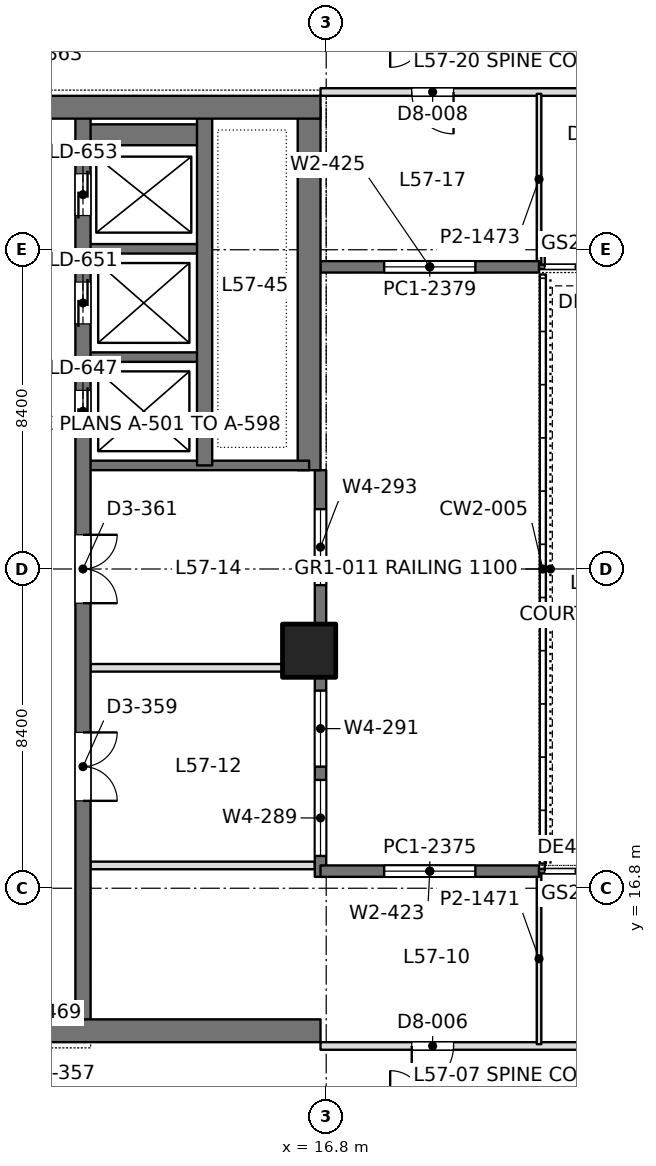
"""IFC4 building model, lengths in metres.
Left out: names, types, materials, properties, quantities, classifications, styles, units other than length and angle.
Written with IfcOpenShell. Run it as: python <this file> out.ifc"""

import sys

from ifc_helpers import new_model, si_unit, direction, frame, frame_2d, origin, origin_2d, place, context, subcontext, project, spatial, rectangle, extrude, element, fill, save


model = new_model("IFC4")
c1 = context("Model", 3, precision=1e-05, world=origin(), true_north=direction((0.0, 1.0)))
c2 = subcontext(c1, "Body", "Model", "MODEL_VIEW")
j1 = project(units=[si_unit("LENGTHUNIT", "METRE"), si_unit("PLANEANGLEUNIT", "RADIAN")], contexts=[c1])
p1 = place(None, origin())
s1 = spatial("IfcSite", under=j1, at=p1, CompositionType="ELEMENT")
p2 = place(p1, origin())
s2 = spatial("IfcBuilding", under=s1, at=p2, CompositionType="ELEMENT")
p3 = place(p2, frame((0.0, 0.0, 250.2)))
s3 = spatial("IfcBuildingStorey", under=s2, at=p3, CompositionType="ELEMENT", Elevation=250.2)
p4 = place(p3, frame((16.35, 23.05, 0.0), z_axis=(0.0, 0.0, 1.0), x_axis=(1.0, 0.0, 0.0)))
e1 = element("IfcColumn", 1, at=p4, inside=s3, PredefinedType="COLUMN", context=c2, shape_type="SweptSolid", body=[
    extrude(rectangle(XDim=1.4, YDim=1.4, at=origin_2d()), origin(), (0.0, 0.0, 1.0), 4.5),
])
p5 = place(p3, frame((-1.05, 13.05, 0.0), z_axis=(0.0, 0.0, 1.0), x_axis=(1.0, 0.0, 0.0)))
e2 = element("IfcWall", 2, at=p5, inside=s3, PredefinedType="SHEAR", context=c2, shape_type="SweptSolid", body=[
    extrude(rectangle(XDim=17.7, YDim=0.6, at=frame_2d((8.85, 0.0))), origin(), (0.0, 0.0, 1.0), 4.5),
])
p6 = place(p5, frame((8.8, 0.0, 0.0)))
e3 = element("IfcOpeningElement", 3, at=p6, cuts=e2, PredefinedType="OPENING", context=c2, shape_type="SweptSolid", body=[
    extrude(rectangle(XDim=1.8, YDim=2.4, at=frame_2d((0.9, 1.2))), frame((0.0, 0.31, 0.0), z_axis=(0.0, -1.0, 0.0), x_axis=(1.0, 0.0, 0.0)), (0.0, 0.0, 1.0), 0.62),
])
p7 = place(p3, frame((-1.05, 37.35, 0.0), z_axis=(0.0, 0.0, 1.0), x_axis=(1.0, 0.0, 0.0)))
e4 = element("IfcWall", 4, at=p7, inside=s3, PredefinedType="SHEAR", context=c2, shape_type="SweptSolid", body=[
    extrude(rectangle(XDim=17.7, YDim=0.6, at=frame_2d((8.85, 0.0))), origin(), (0.0, 0.0, 1.0), 4.5),
])
p8 = place(p7, frame((8.8, 0.0, 0.0)))
e5 = element("IfcOpeningElement", 5, at=p8, cuts=e4, PredefinedType="OPENING", context=c2, shape_type="SweptSolid", body=[
    extrude(rectangle(XDim=1.8, YDim=2.4, at=frame_2d((0.9, 1.2))), frame((0.0, 0.31, 0.0), z_axis=(0.0, -1.0, 0.0), x_axis=(1.0, 0.0, 0.0)), (0.0, 0.0, 1.0), 0.62),
])
p9 = place(p3, frame((16.35, 27.8, 0.0), z_axis=(0.0, 0.0, 1.0), x_axis=(0.0, 1.0, 0.0)))
e6 = element("IfcWall", 6, at=p9, inside=s3, PredefinedType="SHEAR", context=c2, shape_type="SweptSolid", body=[
    extrude(rectangle(XDim=9.55, YDim=0.6, at=frame_2d((4.775, 0.0))), origin(), (0.0, 0.0, 1.0), 4.5),
])
p10 = place(p3, frame((10.4, 13.05, 0.0), z_axis=(0.0, 0.0, 1.0), x_axis=(0.0, 1.0, 0.0)))
e7 = element("IfcWall", 7, at=p10, inside=s3, PredefinedType="SHEAR", context=c2, shape_type="SweptSolid", body=[
    extrude(rectangle(XDim=24.3, YDim=0.4, at=frame_2d((12.15, 0.0))), origin(), (0.0, 0.0, 1.0), 4.5),
])
p11 = place(p10, frame((15.75, 0.0, 0.0)))
e8 = element("IfcOpeningElement", 8, at=p11, cuts=e7, PredefinedType="OPENING", context=c2, shape_type="SweptSolid", body=[
    extrude(rectangle(XDim=1.1, YDim=2.2, at=frame_2d((0.55, 1.1))), frame((0.0, 0.21, 0.0), z_axis=(0.0, -1.0, 0.0), x_axis=(1.0, 0.0, 0.0)), (0.0, 0.0, 1.0), 0.42),
])
p12 = place(p10, frame((18.6, 0.0, 0.0)))
e9 = element("IfcOpeningElement", 9, at=p12, cuts=e7, PredefinedType="OPENING", context=c2, shape_type="SweptSolid", body=[
    extrude(rectangle(XDim=1.1, YDim=2.2, at=frame_2d((0.55, 1.1))), frame((0.0, 0.21, 0.0), z_axis=(0.0, -1.0, 0.0), x_axis=(1.0, 0.0, 0.0)), (0.0, 0.0, 1.0), 0.42),
])
p13 = place(p10, frame((21.45, 0.0, 0.0)))
e10 = element("IfcOpeningElement", 10, at=p13, cuts=e7, PredefinedType="OPENING", context=c2, shape_type="SweptSolid", body=[
    extrude(rectangle(XDim=1.1, YDim=2.2, at=frame_2d((0.55, 1.1))), frame((0.0, 0.21, 0.0), z_axis=(0.0, -1.0, 0.0), x_axis=(1.0, 0.0, 0.0)), (0.0, 0.0, 1.0), 0.42),
])
p14 = place(p10, frame((6.05, 0.0, 0.0)))
e11 = element("IfcOpeningElement", 11, at=p14, cuts=e7, PredefinedType="OPENING", context=c2, shape_type="SweptSolid", body=[
    extrude(rectangle(XDim=1.8, YDim=2.4, at=frame_2d((0.9, 1.2))), frame((0.0, 0.21, 0.0), z_axis=(0.0, -1.0, 0.0), x_axis=(1.0, 0.0, 0.0)), (0.0, 0.0, 1.0), 0.42),
])
p15 = place(p10, frame((11.25, 0.0, 0.0)))
e12 = element("IfcOpeningElement", 12, at=p15, cuts=e7, PredefinedType="OPENING", context=c2, shape_type="SweptSolid", body=[
    extrude(rectangle(XDim=1.8, YDim=2.4, at=frame_2d((0.9, 1.2))), frame((0.0, 0.21, 0.0), z_axis=(0.0, -1.0, 0.0), x_axis=(1.0, 0.0, 0.0)), (0.0, 0.0, 1.0), 0.42),
])
p16 = place(p3, frame((13.6, 27.925, 0.0), z_axis=(0.0, 0.0, 1.0), x_axis=(0.0, 1.0, 0.0)))
e13 = element("IfcWall", 13, at=p16, inside=s3, PredefinedType="SHEAR", context=c2, shape_type="SweptSolid", body=[
    extrude(rectangle(XDim=9.425, YDim=0.4, at=frame_2d((4.712, 0.0))), origin(), (0.0, 0.0, 1.0), 4.5),
])
p17 = place(p3, frame((10.4, 27.925, 0.0), z_axis=(0.0, 0.0, 1.0), x_axis=(1.0, 0.0, 0.0)))
e14 = element("IfcWall", 14, at=p17, inside=s3, PredefinedType="SHEAR", context=c2, shape_type="SweptSolid", body=[
    extrude(rectangle(XDim=5.95, YDim=0.25, at=frame_2d((2.975, 0.0))), origin(), (0.0, 0.0, 1.0), 4.5),
])
for number, where, z_axis, x_axis in (
    (15, (10.4, 30.775, 0.0), (0.0, 0.0, 1.0), (1.0, 0.0, 0.0)),
    (16, (10.4, 33.625, 0.0), (0.0, 0.0, 1.0), (1.0, 0.0, 0.0)),
):
    element("IfcWall", number, at=place(p3, frame(where, z_axis=z_axis, x_axis=x_axis)), inside=s3, PredefinedType="SHEAR", context=c2, shape_type="SweptSolid", body=[
        extrude(rectangle(XDim=3.2, YDim=0.25, at=frame_2d((1.6, 0.0))), origin(), (0.0, 0.0, 1.0), 4.5),
    ])
p18 = place(p3, frame((10.4, 36.625, 0.0), z_axis=(0.0, 0.0, 1.0), x_axis=(1.0, 0.0, 0.0)))
e17 = element("IfcWall", 17, at=p18, inside=s3, PredefinedType="SHEAR", context=c2, shape_type="SweptSolid", body=[
    extrude(rectangle(XDim=3.2, YDim=0.55, at=frame_2d((1.6, 0.0))), origin(), (0.0, 0.0, 1.0), 4.5),
])
p19 = place(p3, frame((16.65, 17.1, 0.0), z_axis=(0.0, 0.0, 1.0), x_axis=(0.0, 1.0, 0.0)))
e18 = element("IfcWall", 18, at=p19, inside=s3, PredefinedType="SOLIDWALL", context=c2, shape_type="SweptSolid", body=[
    extrude(rectangle(XDim=10.7, YDim=0.3, at=frame_2d((5.35, 0.0))), origin(), (0.0, 0.0, 1.0), 4.35),
])
p20 = place(p19, frame((0.55, 0.0, 0.9)))
e19 = element("IfcOpeningElement", 19, at=p20, cuts=e18, PredefinedType="OPENING", context=c2, shape_type="SweptSolid", body=[
    extrude(rectangle(XDim=2.0, YDim=1.9, at=frame_2d((1.0, 0.95))), frame((0.0, 0.16, 0.0), z_axis=(0.0, -1.0, 0.0), x_axis=(1.0, 0.0, 0.0)), (0.0, 0.0, 1.0), 0.32),
])
p21 = place(p19, frame((2.9, 0.0, 0.9)))
e20 = element("IfcOpeningElement", 20, at=p21, cuts=e18, PredefinedType="OPENING", context=c2, shape_type="SweptSolid", body=[
    extrude(rectangle(XDim=2.0, YDim=1.9, at=frame_2d((1.0, 0.95))), frame((0.0, 0.16, 0.0), z_axis=(0.0, -1.0, 0.0), x_axis=(1.0, 0.0, 0.0)), (0.0, 0.0, 1.0), 0.32),
])
p22 = place(p19, frame((7.675, 0.0, 0.9)))
e21 = element("IfcOpeningElement", 21, at=p22, cuts=e18, PredefinedType="OPENING", context=c2, shape_type="SweptSolid", body=[
    extrude(rectangle(XDim=2.0, YDim=1.9, at=frame_2d((1.0, 0.95))), frame((0.0, 0.16, 0.0), z_axis=(0.0, -1.0, 0.0), x_axis=(1.0, 0.0, 0.0)), (0.0, 0.0, 1.0), 0.32),
])
p23 = place(p3, frame((16.65, 17.25, 0.0), z_axis=(0.0, 0.0, 1.0), x_axis=(1.0, 0.0, 0.0)))
e22 = element("IfcWall", 22, at=p23, inside=s3, PredefinedType="SOLIDWALL", context=c2, shape_type="SweptSolid", body=[
    extrude(rectangle(XDim=5.75, YDim=0.3, at=frame_2d((2.875, 0.0))), origin(), (0.0, 0.0, 1.0), 4.35),
])
p24 = place(p23, frame((1.675, 0.0, 0.9)))
e23 = element("IfcOpeningElement", 23, at=p24, cuts=e22, PredefinedType="OPENING", context=c2, shape_type="SweptSolid", body=[
    extrude(rectangle(XDim=2.4, YDim=1.9, at=frame_2d((1.2, 0.95))), frame((0.0, 0.16, 0.0), z_axis=(0.0, -1.0, 0.0), x_axis=(1.0, 0.0, 0.0)), (0.0, 0.0, 1.0), 0.32),
])
p25 = place(p3, frame((22.4, 17.25, 0.0), z_axis=(0.0, 0.0, 1.0), x_axis=(1.0, 0.0, 0.0)))
e24 = element("IfcWall", 24, at=p25, inside=s3, PredefinedType="SOLIDWALL", context=c2, shape_type="SweptSolid", body=[
    extrude(rectangle(XDim=2.3, YDim=0.12, at=frame_2d((1.15, 0.0))), origin(), (0.0, 0.0, 1.0), 4.35),
])
p26 = place(p25, frame((0.15, 0.0, 0.0)))
e25 = element("IfcOpeningElement", 25, at=p26, cuts=e24, PredefinedType="OPENING", context=c2, shape_type="SweptSolid", body=[
    extrude(rectangle(XDim=1.8, YDim=2.4, at=frame_2d((0.9, 1.2))), frame((0.0, 0.07, 0.0), z_axis=(0.0, -1.0, 0.0), x_axis=(1.0, 0.0, 0.0)), (0.0, 0.0, 1.0), 0.14),
])
p27 = place(p3, frame((16.65, 33.15, 0.0), z_axis=(0.0, 0.0, 1.0), x_axis=(1.0, 0.0, 0.0)))
e26 = element("IfcWall", 26, at=p27, inside=s3, PredefinedType="SOLIDWALL", context=c2, shape_type="SweptSolid", body=[
    extrude(rectangle(XDim=5.75, YDim=0.3, at=frame_2d((2.875, 0.0))), origin(), (0.0, 0.0, 1.0), 4.35),
])
p28 = place(p27, frame((1.675, 0.0, 0.9)))
e27 = element("IfcOpeningElement", 27, at=p28, cuts=e26, PredefinedType="OPENING", context=c2, shape_type="SweptSolid", body=[
    extrude(rectangle(XDim=2.4, YDim=1.9, at=frame_2d((1.2, 0.95))), frame((0.0, 0.16, 0.0), z_axis=(0.0, -1.0, 0.0), x_axis=(1.0, 0.0, 0.0)), (0.0, 0.0, 1.0), 0.32),
])
p29 = place(p3, frame((22.4, 33.15, 0.0), z_axis=(0.0, 0.0, 1.0), x_axis=(1.0, 0.0, 0.0)))
e28 = element("IfcWall", 28, at=p29, inside=s3, PredefinedType="SOLIDWALL", context=c2, shape_type="SweptSolid", body=[
    extrude(rectangle(XDim=2.3, YDim=0.12, at=frame_2d((1.15, 0.0))), origin(), (0.0, 0.0, 1.0), 4.35),
])
p30 = place(p29, frame((0.15, 0.0, 0.0)))
e29 = element("IfcOpeningElement", 29, at=p30, cuts=e28, PredefinedType="OPENING", context=c2, shape_type="SweptSolid", body=[
    extrude(rectangle(XDim=1.8, YDim=2.4, at=frame_2d((0.9, 1.2))), frame((0.0, 0.07, 0.0), z_axis=(0.0, -1.0, 0.0), x_axis=(1.0, 0.0, 0.0)), (0.0, 0.0, 1.0), 0.14),
])
p31 = place(p3, frame((10.598, 17.4, 0.0), z_axis=(0.0, 0.0, 1.0), x_axis=(1.0, 0.0, 0.0)))
e30 = element("IfcWall", 30, at=p31, inside=s3, PredefinedType="PARTITIONING", context=c2, shape_type="SweptSolid", body=[
    extrude(rectangle(XDim=5.904, YDim=0.2, at=frame_2d((2.952, 0.0))), origin(), (0.0, 0.0, 1.0), 3.8),
])
p32 = place(p3, frame((10.598, 22.6, 0.0), z_axis=(0.0, 0.0, 1.0), x_axis=(1.0, 0.0, 0.0)))
e31 = element("IfcWall", 31, at=p32, inside=s3, PredefinedType="PARTITIONING", context=c2, shape_type="SweptSolid", body=[
    extrude(rectangle(XDim=5.053, YDim=0.2, at=frame_2d((2.526, 0.0))), origin(), (0.0, 0.0, 1.0), 4.35),
])
p33 = place(p3, frame((16.65, 12.65, 0.0), z_axis=(0.0, 0.0, 1.0), x_axis=(1.0, 0.0, 0.0)))
e32 = element("IfcWall", 32, at=p33, inside=s3, PredefinedType="PARTITIONING", context=c2, shape_type="SweptSolid", body=[
    extrude(rectangle(XDim=17.1, YDim=0.2, at=frame_2d((8.55, 0.0))), origin(), (0.0, 0.0, 1.0), 3.8),
])
p34 = place(p33, frame((2.4, 0.0, 0.0)))
e33 = element("IfcOpeningElement", 33, at=p34, cuts=e32, PredefinedType="OPENING", context=c2, shape_type="SweptSolid", body=[
    extrude(rectangle(XDim=1.1, YDim=2.4, at=frame_2d((0.55, 1.2))), frame((0.0, 0.11, 0.0), z_axis=(0.0, -1.0, 0.0), x_axis=(1.0, 0.0, 0.0)), (0.0, 0.0, 1.0), 0.22),
])
p35 = place(p33, frame((7.65, 0.0, 0.0)))
e34 = element("IfcOpeningElement", 34, at=p35, cuts=e32, PredefinedType="OPENING", context=c2, shape_type="SweptSolid", body=[
    extrude(rectangle(XDim=1.8, YDim=2.2, at=frame_2d((0.9, 1.1))), frame((0.0, 0.11, 0.0), z_axis=(0.0, -1.0, 0.0), x_axis=(1.0, 0.0, 0.0)), (0.0, 0.0, 1.0), 0.22),
])
p36 = place(p33, frame((13.6, 0.0, 0.0)))
e35 = element("IfcOpeningElement", 35, at=p36, cuts=e32, PredefinedType="OPENING", context=c2, shape_type="SweptSolid", body=[
    extrude(rectangle(XDim=1.1, YDim=2.4, at=frame_2d((0.55, 1.2))), frame((0.0, 0.11, 0.0), z_axis=(0.0, -1.0, 0.0), x_axis=(1.0, 0.0, 0.0)), (0.0, 0.0, 1.0), 0.22),
])
p37 = place(p3, frame((22.4, 12.698, 0.0), z_axis=(0.0, 0.0, 1.0), x_axis=(0.0, 1.0, 0.0)))
e36 = element("IfcWall", 36, at=p37, inside=s3, PredefinedType="PARTITIONING", context=c2, shape_type="SweptSolid", body=[
    extrude(rectangle(XDim=4.494, YDim=0.12, at=frame_2d((2.247, 0.0))), origin(), (0.0, 0.0, 1.0), 3.5),
])
p38 = place(p3, frame((16.65, 37.75, 0.0), z_axis=(0.0, 0.0, 1.0), x_axis=(1.0, 0.0, 0.0)))
e37 = element("IfcWall", 37, at=p38, inside=s3, PredefinedType="PARTITIONING", context=c2, shape_type="SweptSolid", body=[
    extrude(rectangle(XDim=17.1, YDim=0.2, at=frame_2d((8.55, 0.0))), origin(), (0.0, 0.0, 1.0), 3.8),
])
p39 = place(p38, frame((2.4, 0.0, 0.0)))
e38 = element("IfcOpeningElement", 38, at=p39, cuts=e37, PredefinedType="OPENING", context=c2, shape_type="SweptSolid", body=[
    extrude(rectangle(XDim=1.1, YDim=2.4, at=frame_2d((0.55, 1.2))), frame((0.0, 0.11, 0.0), z_axis=(0.0, -1.0, 0.0), x_axis=(1.0, 0.0, 0.0)), (0.0, 0.0, 1.0), 0.22),
])
p40 = place(p38, frame((7.65, 0.0, 0.0)))
e39 = element("IfcOpeningElement", 39, at=p40, cuts=e37, PredefinedType="OPENING", context=c2, shape_type="SweptSolid", body=[
    extrude(rectangle(XDim=1.8, YDim=2.2, at=frame_2d((0.9, 1.1))), frame((0.0, 0.11, 0.0), z_axis=(0.0, -1.0, 0.0), x_axis=(1.0, 0.0, 0.0)), (0.0, 0.0, 1.0), 0.22),
])
p41 = place(p38, frame((13.6, 0.0, 0.0)))
e40 = element("IfcOpeningElement", 40, at=p41, cuts=e37, PredefinedType="OPENING", context=c2, shape_type="SweptSolid", body=[
    extrude(rectangle(XDim=1.1, YDim=2.4, at=frame_2d((0.55, 1.2))), frame((0.0, 0.11, 0.0), z_axis=(0.0, -1.0, 0.0), x_axis=(1.0, 0.0, 0.0)), (0.0, 0.0, 1.0), 0.22),
])
p42 = place(p3, frame((22.4, 33.208, 0.0), z_axis=(0.0, 0.0, 1.0), x_axis=(0.0, 1.0, 0.0)))
e41 = element("IfcWall", 41, at=p42, inside=s3, PredefinedType="PARTITIONING", context=c2, shape_type="SweptSolid", body=[
    extrude(rectangle(XDim=4.494, YDim=0.12, at=frame_2d((2.247, 0.0))), origin(), (0.0, 0.0, 1.0), 3.5),
])
p43 = place(p20, origin())
e42 = element("IfcWindow", 42, at=p43, inside=s3, PartitioningType="SINGLE_PANEL", PredefinedType="WINDOW", context=c2, shape_type="SweptSolid", body=[
    extrude(rectangle(XDim=2.0, YDim=1.9, at=frame_2d((1.0, 0.95))), frame((0.0, 0.03, 0.0), z_axis=(0.0, -1.0, 0.0), x_axis=(1.0, 0.0, 0.0)), (0.0, 0.0, 1.0), 0.06),
])
fill(e19, e42)
p44 = place(p21, origin())
e43 = element("IfcWindow", 43, at=p44, inside=s3, PartitioningType="SINGLE_PANEL", PredefinedType="WINDOW", context=c2, shape_type="SweptSolid", body=[
    extrude(rectangle(XDim=2.0, YDim=1.9, at=frame_2d((1.0, 0.95))), frame((0.0, 0.03, 0.0), z_axis=(0.0, -1.0, 0.0), x_axis=(1.0, 0.0, 0.0)), (0.0, 0.0, 1.0), 0.06),
])
fill(e20, e43)
p45 = place(p22, origin())
e44 = element("IfcWindow", 44, at=p45, inside=s3, PartitioningType="SINGLE_PANEL", PredefinedType="WINDOW", context=c2, shape_type="SweptSolid", body=[
    extrude(rectangle(XDim=2.0, YDim=1.9, at=frame_2d((1.0, 0.95))), frame((0.0, 0.03, 0.0), z_axis=(0.0, -1.0, 0.0), x_axis=(1.0, 0.0, 0.0)), (0.0, 0.0, 1.0), 0.06),
])
fill(e21, e44)
p46 = place(p24, origin())
e45 = element("IfcWindow", 45, at=p46, inside=s3, PartitioningType="SINGLE_PANEL", PredefinedType="WINDOW", context=c2, shape_type="SweptSolid", body=[
    extrude(rectangle(XDim=2.4, YDim=1.9, at=frame_2d((1.2, 0.95))), frame((0.0, 0.03, 0.0), z_axis=(0.0, -1.0, 0.0), x_axis=(1.0, 0.0, 0.0)), (0.0, 0.0, 1.0), 0.06),
])
fill(e23, e45)
p47 = place(p26, origin())
e46 = element("IfcDoor", 46, at=p47, inside=s3, OperationType="DOUBLE_DOOR_SINGLE_SWING", PredefinedType="DOOR", context=c2, shape_type="SweptSolid", body=[
    extrude(rectangle(XDim=1.8, YDim=2.4, at=frame_2d((0.9, 1.2))), frame((0.0, 0.025, 0.0), z_axis=(0.0, -1.0, 0.0), x_axis=(1.0, 0.0, 0.0)), (0.0, 0.0, 1.0), 0.05),
])
fill(e25, e46)
p48 = place(p28, origin())
e47 = element("IfcWindow", 47, at=p48, inside=s3, PartitioningType="SINGLE_PANEL", PredefinedType="WINDOW", context=c2, shape_type="SweptSolid", body=[
    extrude(rectangle(XDim=2.4, YDim=1.9, at=frame_2d((1.2, 0.95))), frame((0.0, 0.03, 0.0), z_axis=(0.0, -1.0, 0.0), x_axis=(1.0, 0.0, 0.0)), (0.0, 0.0, 1.0), 0.06),
])
fill(e27, e47)
p49 = place(p30, origin())
e48 = element("IfcDoor", 48, at=p49, inside=s3, OperationType="DOUBLE_DOOR_SINGLE_SWING", PredefinedType="DOOR", context=c2, shape_type="SweptSolid", body=[
    extrude(rectangle(XDim=1.8, YDim=2.4, at=frame_2d((0.9, 1.2))), frame((0.0, 0.025, 0.0), z_axis=(0.0, -1.0, 0.0), x_axis=(1.0, 0.0, 0.0)), (0.0, 0.0, 1.0), 0.05),
])
fill(e29, e48)
p50 = place(p11, origin())
e49 = element("IfcDoor", 49, at=p50, inside=s3, OperationType="DOUBLE_DOOR_SLIDING", PredefinedType="DOOR", context=c2, shape_type="SweptSolid", body=[
    extrude(rectangle(XDim=1.1, YDim=2.2, at=frame_2d((0.55, 1.1))), frame((0.0, 0.025, 0.0), z_axis=(0.0, -1.0, 0.0), x_axis=(1.0, 0.0, 0.0)), (0.0, 0.0, 1.0), 0.05),
])
fill(e8, e49)
p51 = place(p12, origin())
e50 = element("IfcDoor", 50, at=p51, inside=s3, OperationType="DOUBLE_DOOR_SLIDING", PredefinedType="DOOR", context=c2, shape_type="SweptSolid", body=[
    extrude(rectangle(XDim=1.1, YDim=2.2, at=frame_2d((0.55, 1.1))), frame((0.0, 0.025, 0.0), z_axis=(0.0, -1.0, 0.0), x_axis=(1.0, 0.0, 0.0)), (0.0, 0.0, 1.0), 0.05),
])
fill(e9, e50)
p52 = place(p13, origin())
e51 = element("IfcDoor", 51, at=p52, inside=s3, OperationType="DOUBLE_DOOR_SLIDING", PredefinedType="DOOR", context=c2, shape_type="SweptSolid", body=[
    extrude(rectangle(XDim=1.1, YDim=2.2, at=frame_2d((0.55, 1.1))), frame((0.0, 0.025, 0.0), z_axis=(0.0, -1.0, 0.0), x_axis=(1.0, 0.0, 0.0)), (0.0, 0.0, 1.0), 0.05),
])
fill(e10, e51)
p53 = place(p14, frame((1.8, 0.0, 0.0), z_axis=(0.0, 0.0, 1.0), x_axis=(-1.0, 0.0, 0.0)))
e52 = element("IfcDoor", 52, at=p53, inside=s3, OperationType="DOUBLE_DOOR_SINGLE_SWING", PredefinedType="DOOR", context=c2, shape_type="SweptSolid", body=[
    extrude(rectangle(XDim=1.8, YDim=2.4, at=frame_2d((0.9, 1.2))), frame((0.0, 0.025, 0.0), z_axis=(0.0, -1.0, 0.0), x_axis=(1.0, 0.0, 0.0)), (0.0, 0.0, 1.0), 0.05),
])
fill(e11, e52)
p54 = place(p15, frame((1.8, 0.0, 0.0), z_axis=(0.0, 0.0, 1.0), x_axis=(-1.0, 0.0, 0.0)))
e53 = element("IfcDoor", 53, at=p54, inside=s3, OperationType="DOUBLE_DOOR_SINGLE_SWING", PredefinedType="DOOR", context=c2, shape_type="SweptSolid", body=[
    extrude(rectangle(XDim=1.8, YDim=2.4, at=frame_2d((0.9, 1.2))), frame((0.0, 0.025, 0.0), z_axis=(0.0, -1.0, 0.0), x_axis=(1.0, 0.0, 0.0)), (0.0, 0.0, 1.0), 0.05),
])
fill(e12, e53)
p55 = place(p34, frame((1.1, 0.0, 0.0), z_axis=(0.0, 0.0, 1.0), x_axis=(-1.0, 0.0, 0.0)))
e54 = element("IfcDoor", 54, at=p55, inside=s3, OperationType="SINGLE_SWING_RIGHT", PredefinedType="DOOR", context=c2, shape_type="SweptSolid", body=[
    extrude(rectangle(XDim=1.1, YDim=2.4, at=frame_2d((0.55, 1.2))), frame((0.0, 0.025, 0.0), z_axis=(0.0, -1.0, 0.0), x_axis=(1.0, 0.0, 0.0)), (0.0, 0.0, 1.0), 0.05),
])
fill(e33, e54)
p56 = place(p39, frame((1.1, 0.0, 0.0), z_axis=(0.0, 0.0, 1.0), x_axis=(-1.0, 0.0, 0.0)))
e55 = element("IfcDoor", 55, at=p56, inside=s3, OperationType="SINGLE_SWING_LEFT", PredefinedType="DOOR", context=c2, shape_type="SweptSolid", body=[
    extrude(rectangle(XDim=1.1, YDim=2.4, at=frame_2d((0.55, 1.2))), frame((0.0, 0.025, 0.0), z_axis=(0.0, -1.0, 0.0), x_axis=(1.0, 0.0, 0.0)), (0.0, 0.0, 1.0), 0.05),
])
fill(e38, e55)
save(model, sys.argv[1])
